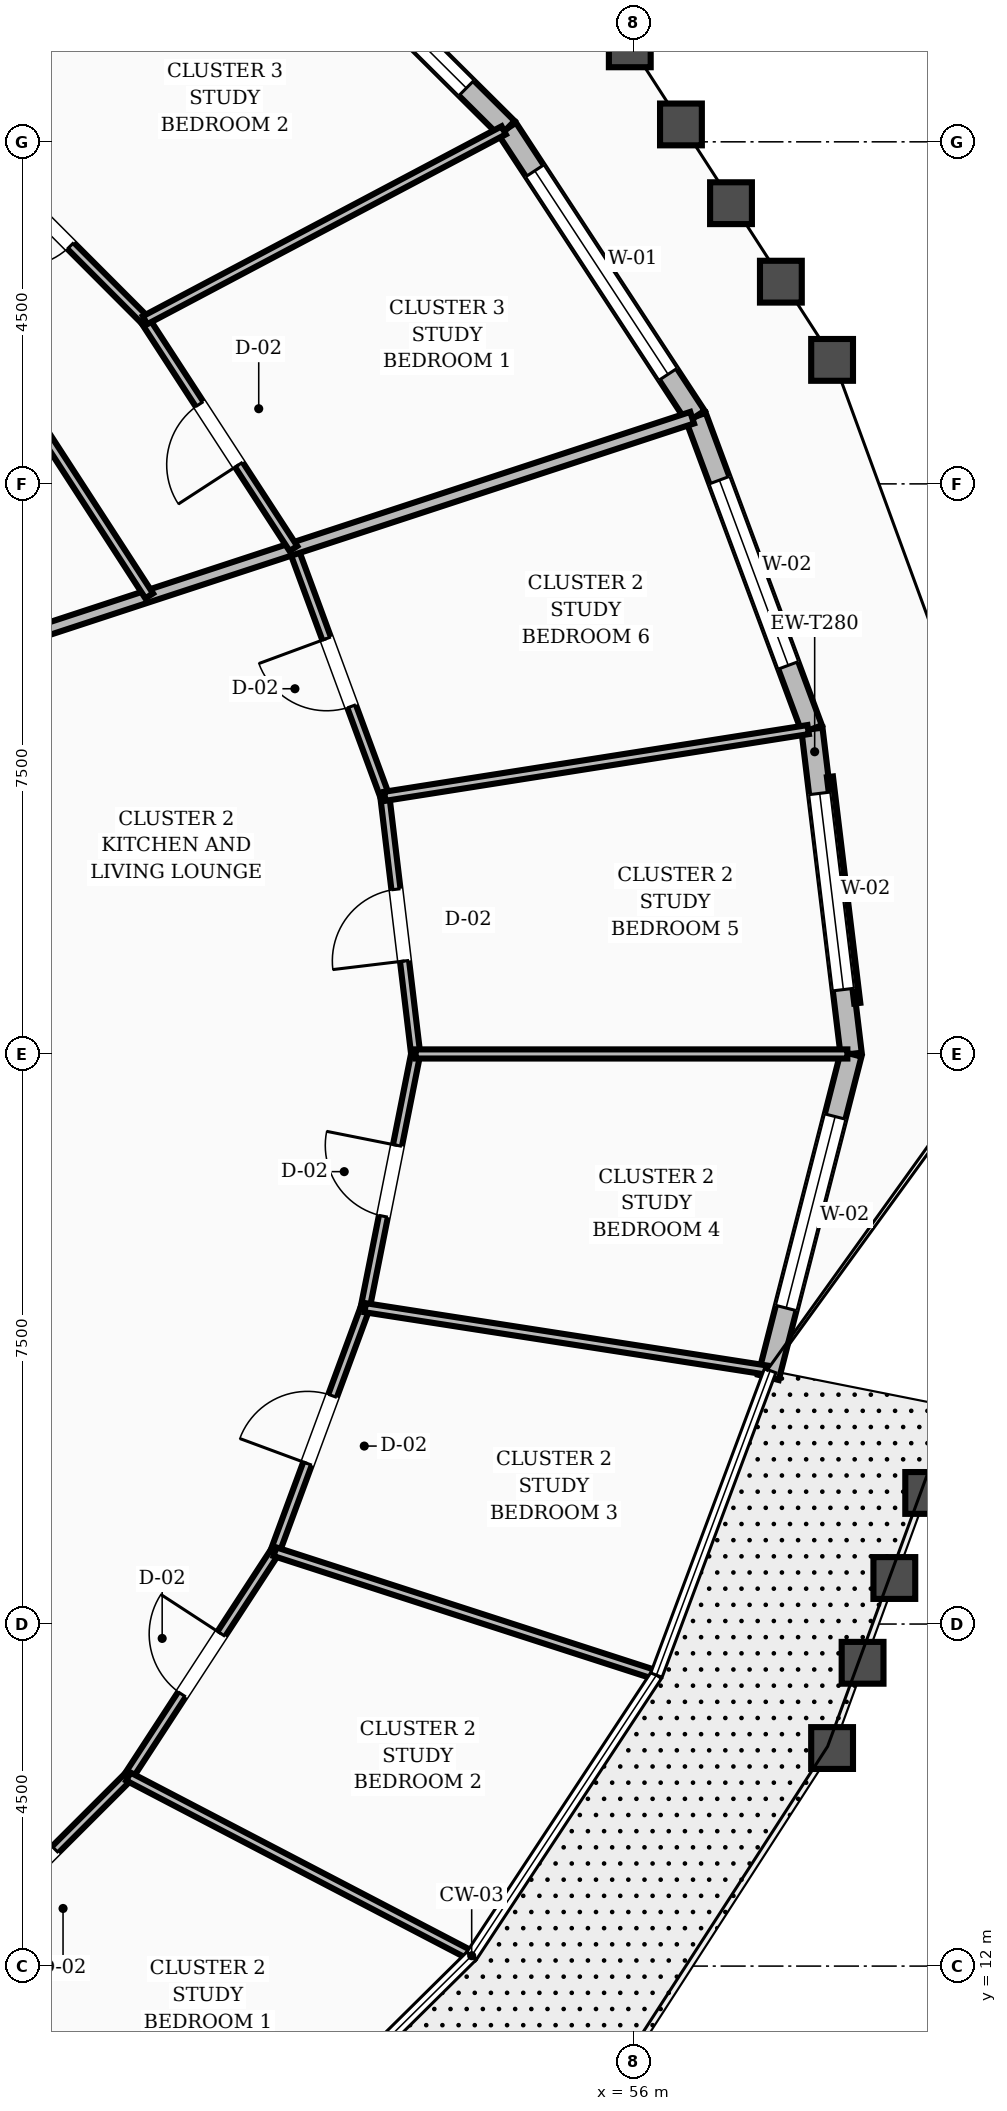
"""IFC4 building model, lengths in metres.
Left out: names, types, materials, properties, quantities, classifications, styles, units other than length and angle.
Written with IfcOpenShell. Run it as: python <this file> out.ifc"""

import sys

from ifc_helpers import new_model, si_unit, direction, frame, frame_2d, origin, place, context, subcontext, project, spatial, rectangle, extrude, element, fill, save


model = new_model("IFC4")
c1 = context("Model", 3, precision=1e-05, world=origin(), true_north=direction((0.0, 1.0)))
c2 = subcontext(c1, "Body", "Model", "MODEL_VIEW")
j1 = project(units=[si_unit("LENGTHUNIT", "METRE"), si_unit("PLANEANGLEUNIT", "RADIAN")], contexts=[c1])
p1 = place(None, origin())
s1 = spatial("IfcSite", under=j1, at=p1, CompositionType="ELEMENT")
p2 = place(p1, origin())
s2 = spatial("IfcBuilding", under=s1, at=p2, CompositionType="ELEMENT")
p3 = place(p2, frame((0.0, 0.0, 102.4)))
s3 = spatial("IfcBuildingStorey", under=s2, at=p3, CompositionType="ELEMENT", Elevation=102.4)
p4 = place(p3, frame((58.86, 24.0, 0.0), z_axis=(0.0, 0.0, 1.0), x_axis=(-0.119853881621, 0.992791542601, 0.0)))
e1 = element("IfcWall", 1, at=p4, inside=s3, PredefinedType="STANDARD", context=c2, shape_type="SweptSolid", body=[
    extrude(rectangle(XDim=4.306, YDim=0.28, at=frame_2d((2.153, 0.0))), origin(), (0.0, 0.0, 1.0), 2.67),
])
p5 = place(p4, frame((0.853, 0.0, 0.8)))
e2 = element("IfcOpeningElement", 2, at=p5, cuts=e1, PredefinedType="OPENING", context=c2, shape_type="SweptSolid", body=[
    extrude(rectangle(XDim=2.6, YDim=1.65, at=frame_2d((1.3, 0.825))), frame((0.0, 0.15, 0.0), z_axis=(0.0, -1.0, 0.0), x_axis=(1.0, 0.0, 0.0)), (0.0, 0.0, 1.0), 0.3),
])
p6 = place(p3, frame((58.344, 28.275, 0.0), z_axis=(0.0, 0.0, 1.0), x_axis=(-0.3485233369, 0.937300103295, 0.0)))
e3 = element("IfcWall", 3, at=p6, inside=s3, PredefinedType="STANDARD", context=c2, shape_type="SweptSolid", body=[
    extrude(rectangle(XDim=4.386, YDim=0.28, at=frame_2d((2.193, 0.0))), origin(), (0.0, 0.0, 1.0), 2.67),
])
p7 = place(p6, frame((0.893, 0.0, 0.8)))
e4 = element("IfcOpeningElement", 4, at=p7, cuts=e3, PredefinedType="OPENING", context=c2, shape_type="SweptSolid", body=[
    extrude(rectangle(XDim=2.6, YDim=1.65, at=frame_2d((1.3, 0.825))), frame((0.0, 0.15, 0.0), z_axis=(0.0, -1.0, 0.0), x_axis=(1.0, 0.0, 0.0)), (0.0, 0.0, 1.0), 0.3),
])
p8 = place(p3, frame((56.815, 32.386, 0.0), z_axis=(0.0, 0.0, 1.0), x_axis=(-0.547989842324, 0.836484986542, 0.0)))
e5 = element("IfcWall", 5, at=p8, inside=s3, PredefinedType="STANDARD", context=c2, shape_type="SweptSolid", body=[
    extrude(rectangle(XDim=4.529, YDim=0.28, at=frame_2d((2.265, 0.0))), origin(), (0.0, 0.0, 1.0), 2.67),
])
p9 = place(p8, frame((0.665, 0.0, 0.8)))
e6 = element("IfcOpeningElement", 6, at=p9, cuts=e5, PredefinedType="OPENING", context=c2, shape_type="SweptSolid", body=[
    extrude(rectangle(XDim=3.2, YDim=1.65, at=frame_2d((1.6, 0.825))), frame((0.0, 0.15, 0.0), z_axis=(0.0, -1.0, 0.0), x_axis=(1.0, 0.0, 0.0)), (0.0, 0.0, 1.0), 0.3),
])
p10 = place(p3, frame((54.333, 36.175, 0.0), z_axis=(0.0, 0.0, 1.0), x_axis=(-0.709177055594, 0.705030427583, 0.0)))
e7 = element("IfcWall", 7, at=p10, inside=s3, PredefinedType="STANDARD", context=c2, shape_type="SweptSolid", body=[
    extrude(rectangle(XDim=4.71, YDim=0.28, at=frame_2d((2.355, 0.0))), origin(), (0.0, 0.0, 1.0), 2.67),
])
p11 = place(p10, frame((0.755, 0.0, 0.8)))
e8 = element("IfcOpeningElement", 8, at=p11, cuts=e7, PredefinedType="OPENING", context=c2, shape_type="SweptSolid", body=[
    extrude(rectangle(XDim=3.2, YDim=1.65, at=frame_2d((1.6, 0.825))), frame((0.0, 0.15, 0.0), z_axis=(0.0, -1.0, 0.0), x_axis=(1.0, 0.0, 0.0)), (0.0, 0.0, 1.0), 0.3),
])
p12 = place(p3, frame((57.771, 19.745, 0.0), z_axis=(0.0, 0.0, 1.0), x_axis=(0.247764086513, 0.968820394828, 0.0)))
e9 = element("IfcWall", 9, at=p12, inside=s3, PredefinedType="STANDARD", context=c2, shape_type="SweptSolid", body=[
    extrude(rectangle(XDim=4.392, YDim=0.28, at=frame_2d((2.196, 0.0))), origin(), (0.0, 0.0, 1.0), 2.67),
])
p13 = place(p12, frame((0.942, 0.0, 0.8)))
e10 = element("IfcOpeningElement", 10, at=p13, cuts=e9, PredefinedType="OPENING", context=c2, shape_type="SweptSolid", body=[
    extrude(rectangle(XDim=2.6, YDim=1.65, at=frame_2d((1.3, 0.825))), frame((0.0, 0.15, 0.0), z_axis=(0.0, -1.0, 0.0), x_axis=(1.0, 0.0, 0.0)), (0.0, 0.0, 1.0), 0.3),
])
p14 = place(p3, frame((43.349, 14.56, 0.0), z_axis=(0.0, 0.0, 1.0), x_axis=(0.788161960412, -0.615467890438, 0.0)))
e11 = element("IfcWall", 11, at=p14, inside=s3, PredefinedType="SOLIDWALL", context=c2, shape_type="SweptSolid", body=[
    extrude(rectangle(XDim=9.145, YDim=0.16, at=frame_2d((4.573, 0.0))), origin(), (0.0, 0.0, 1.0), 2.67),
])
p15 = place(p3, frame((46.755, 11.9, 0.0), z_axis=(0.0, 0.0, 1.0), x_axis=(0.707406184173, 0.706807251373, 0.0)))
e12 = element("IfcWall", 12, at=p15, inside=s3, PredefinedType="PARTITIONING", context=c2, shape_type="SweptSolid", body=[
    extrude(rectangle(XDim=3.669, YDim=0.12, at=frame_2d((1.834, 0.0))), origin(), (0.0, 0.0, 1.0), 2.67),
])
p16 = place(p15, frame((1.359, 0.0, 0.0)))
e13 = element("IfcOpeningElement", 13, at=p16, cuts=e12, PredefinedType="OPENING", context=c2, shape_type="SweptSolid", body=[
    extrude(rectangle(XDim=0.95, YDim=2.1, at=frame_2d((0.475, 1.05))), frame((0.0, 0.07, 0.0), z_axis=(0.0, -1.0, 0.0), x_axis=(1.0, 0.0, 0.0)), (0.0, 0.0, 1.0), 0.14),
])
p17 = place(p3, frame((49.351, 14.493, 0.0), z_axis=(0.0, 0.0, 1.0), x_axis=(0.546023127997, 0.837770101933, 0.0)))
e14 = element("IfcWall", 14, at=p17, inside=s3, PredefinedType="PARTITIONING", context=c2, shape_type="SweptSolid", body=[
    extrude(rectangle(XDim=3.531, YDim=0.12, at=frame_2d((1.766, 0.0))), origin(), (0.0, 0.0, 1.0), 2.67),
])
p18 = place(p17, frame((1.291, 0.0, 0.0)))
e15 = element("IfcOpeningElement", 15, at=p18, cuts=e14, PredefinedType="OPENING", context=c2, shape_type="SweptSolid", body=[
    extrude(rectangle(XDim=0.95, YDim=2.1, at=frame_2d((0.475, 1.05))), frame((0.0, 0.07, 0.0), z_axis=(0.0, -1.0, 0.0), x_axis=(1.0, 0.0, 0.0)), (0.0, 0.0, 1.0), 0.14),
])
p19 = place(p3, frame((49.351, 14.493, 0.0), z_axis=(0.0, 0.0, 1.0), x_axis=(0.886579668451, -0.462575930512, 0.0)))
e16 = element("IfcWall", 16, at=p19, inside=s3, PredefinedType="PARTITIONING", context=c2, shape_type="SweptSolid", body=[
    extrude(rectangle(XDim=5.045, YDim=0.12, at=frame_2d((2.522, 0.0))), origin(), (0.0, 0.0, 1.0), 2.67),
])
p20 = place(p3, frame((51.279, 17.452, 0.0), z_axis=(0.0, 0.0, 1.0), x_axis=(0.346961196686, 0.937879484792, 0.0)))
e17 = element("IfcWall", 17, at=p20, inside=s3, PredefinedType="PARTITIONING", context=c2, shape_type="SweptSolid", body=[
    extrude(rectangle(XDim=3.423, YDim=0.12, at=frame_2d((1.711, 0.0))), origin(), (0.0, 0.0, 1.0), 2.67),
])
p21 = place(p20, frame((1.236, 0.0, 0.0)))
e18 = element("IfcOpeningElement", 18, at=p21, cuts=e17, PredefinedType="OPENING", context=c2, shape_type="SweptSolid", body=[
    extrude(rectangle(XDim=0.95, YDim=2.1, at=frame_2d((0.475, 1.05))), frame((0.0, 0.07, 0.0), z_axis=(0.0, -1.0, 0.0), x_axis=(1.0, 0.0, 0.0)), (0.0, 0.0, 1.0), 0.14),
])
p22 = place(p3, frame((51.279, 17.452, 0.0), z_axis=(0.0, 0.0, 1.0), x_axis=(0.951467861334, -0.307748125663, 0.0)))
e19 = element("IfcWall", 19, at=p22, inside=s3, PredefinedType="PARTITIONING", context=c2, shape_type="SweptSolid", body=[
    extrude(rectangle(XDim=5.225, YDim=0.12, at=frame_2d((2.612, 0.0))), origin(), (0.0, 0.0, 1.0), 2.67),
])
p23 = place(p3, frame((52.466, 20.662, 0.0), z_axis=(0.0, 0.0, 1.0), x_axis=(0.195164304361, 0.980770561499, 0.0)))
e20 = element("IfcWall", 20, at=p23, inside=s3, PredefinedType="PARTITIONING", context=c2, shape_type="SweptSolid", body=[
    extrude(rectangle(XDim=3.404, YDim=0.12, at=frame_2d((1.702, 0.0))), origin(), (0.0, 0.0, 1.0), 2.67),
])
p24 = place(p23, frame((1.227, 0.0, 0.0)))
e21 = element("IfcOpeningElement", 21, at=p24, cuts=e20, PredefinedType="OPENING", context=c2, shape_type="SweptSolid", body=[
    extrude(rectangle(XDim=0.95, YDim=2.1, at=frame_2d((0.475, 1.05))), frame((0.0, 0.07, 0.0), z_axis=(0.0, -1.0, 0.0), x_axis=(1.0, 0.0, 0.0)), (0.0, 0.0, 1.0), 0.14),
])
p25 = place(p3, frame((52.466, 20.662, 0.0), z_axis=(0.0, 0.0, 1.0), x_axis=(0.988152999311, -0.15347198426, 0.0)))
e22 = element("IfcWall", 22, at=p25, inside=s3, PredefinedType="PARTITIONING", context=c2, shape_type="SweptSolid", body=[
    extrude(rectangle(XDim=5.342, YDim=0.12, at=frame_2d((2.671, 0.0))), origin(), (0.0, 0.0, 1.0), 2.67),
])
p26 = place(p3, frame((53.131, 24.0, 0.0), z_axis=(0.0, 0.0, 1.0), x_axis=(-0.118928080867, 0.992902871172, 0.0)))
e23 = element("IfcWall", 23, at=p26, inside=s3, PredefinedType="PARTITIONING", context=c2, shape_type="SweptSolid", body=[
    extrude(rectangle(XDim=3.414, YDim=0.12, at=frame_2d((1.707, 0.0))), origin(), (0.0, 0.0, 1.0), 2.67),
])
p27 = place(p26, frame((1.232, 0.0, 0.0)))
e24 = element("IfcOpeningElement", 24, at=p27, cuts=e23, PredefinedType="OPENING", context=c2, shape_type="SweptSolid", body=[
    extrude(rectangle(XDim=0.95, YDim=2.1, at=frame_2d((0.475, 1.05))), frame((0.0, 0.07, 0.0), z_axis=(0.0, -1.0, 0.0), x_axis=(1.0, 0.0, 0.0)), (0.0, 0.0, 1.0), 0.14),
])
p28 = place(p3, frame((53.131, 24.0, 0.0), z_axis=(0.0, 0.0, 1.0), x_axis=(1.0, 0.0, 0.0)))
e25 = element("IfcWall", 25, at=p28, inside=s3, PredefinedType="PARTITIONING", context=c2, shape_type="SweptSolid", body=[
    extrude(rectangle(XDim=5.679, YDim=0.12, at=frame_2d((2.839, 0.0))), origin(), (0.0, 0.0, 1.0), 2.67),
])
p29 = place(p3, frame((52.725, 27.39, 0.0), z_axis=(0.0, 0.0, 1.0), x_axis=(-0.346151450403, 0.938178646839, 0.0)))
e26 = element("IfcWall", 26, at=p29, inside=s3, PredefinedType="PARTITIONING", context=c2, shape_type="SweptSolid", body=[
    extrude(rectangle(XDim=3.474, YDim=0.12, at=frame_2d((1.737, 0.0))), origin(), (0.0, 0.0, 1.0), 2.67),
])
p30 = place(p29, frame((1.262, 0.0, 0.0)))
e27 = element("IfcOpeningElement", 27, at=p30, cuts=e26, PredefinedType="OPENING", context=c2, shape_type="SweptSolid", body=[
    extrude(rectangle(XDim=0.95, YDim=2.1, at=frame_2d((0.475, 1.05))), frame((0.0, 0.07, 0.0), z_axis=(0.0, -1.0, 0.0), x_axis=(1.0, 0.0, 0.0)), (0.0, 0.0, 1.0), 0.14),
])
p31 = place(p3, frame((52.725, 27.39, 0.0), z_axis=(0.0, 0.0, 1.0), x_axis=(0.987809965593, 0.155664613436, 0.0)))
e28 = element("IfcWall", 28, at=p31, inside=s3, PredefinedType="PARTITIONING", context=c2, shape_type="SweptSolid", body=[
    extrude(rectangle(XDim=5.638, YDim=0.12, at=frame_2d((2.819, 0.0))), origin(), (0.0, 0.0, 1.0), 2.67),
])
p32 = place(p3, frame((46.828, 29.109, 0.0), z_axis=(0.0, 0.0, 1.0), x_axis=(0.95015260274, 0.311785232984, 0.0)))
e29 = element("IfcWall", 29, at=p32, inside=s3, PredefinedType="SOLIDWALL", context=c2, shape_type="SweptSolid", body=[
    extrude(rectangle(XDim=10.461, YDim=0.16, at=frame_2d((5.23, 0.0))), origin(), (0.0, 0.0, 1.0), 2.67),
])
p33 = place(p3, frame((49.625, 30.026, 0.0), z_axis=(0.0, 0.0, 1.0), x_axis=(-0.543463490986, 0.839432804914, 0.0)))
e30 = element("IfcWall", 30, at=p33, inside=s3, PredefinedType="PARTITIONING", context=c2, shape_type="SweptSolid", body=[
    extrude(rectangle(XDim=3.243, YDim=0.12, at=frame_2d((1.622, 0.0))), origin(), (0.0, 0.0, 1.0), 2.67),
])
p34 = place(p3, frame((51.522, 30.649, 0.0), z_axis=(0.0, 0.0, 1.0), x_axis=(-0.545007511922, 0.838431161127, 0.0)))
e31 = element("IfcWall", 31, at=p34, inside=s3, PredefinedType="PARTITIONING", context=c2, shape_type="SweptSolid", body=[
    extrude(rectangle(XDim=3.583, YDim=0.12, at=frame_2d((1.792, 0.0))), origin(), (0.0, 0.0, 1.0), 2.67),
])
p35 = place(p34, frame((1.316, 0.0, 0.0)))
e32 = element("IfcOpeningElement", 32, at=p35, cuts=e31, PredefinedType="OPENING", context=c2, shape_type="SweptSolid", body=[
    extrude(rectangle(XDim=0.95, YDim=2.1, at=frame_2d((0.475, 1.05))), frame((0.0, 0.07, 0.0), z_axis=(0.0, -1.0, 0.0), x_axis=(1.0, 0.0, 0.0)), (0.0, 0.0, 1.0), 0.14),
])
p36 = place(p3, frame((49.569, 33.653, 0.0), z_axis=(0.0, 0.0, 1.0), x_axis=(-0.706450168387, 0.707762784827, 0.0)))
e33 = element("IfcWall", 33, at=p36, inside=s3, PredefinedType="PARTITIONING", context=c2, shape_type="SweptSolid", body=[
    extrude(rectangle(XDim=3.72, YDim=0.12, at=frame_2d((1.86, 0.0))), origin(), (0.0, 0.0, 1.0), 2.67),
])
p37 = place(p36, frame((1.385, 0.0, 0.0)))
e34 = element("IfcOpeningElement", 34, at=p37, cuts=e33, PredefinedType="OPENING", context=c2, shape_type="SweptSolid", body=[
    extrude(rectangle(XDim=0.95, YDim=2.1, at=frame_2d((0.475, 1.05))), frame((0.0, 0.07, 0.0), z_axis=(0.0, -1.0, 0.0), x_axis=(1.0, 0.0, 0.0)), (0.0, 0.0, 1.0), 0.14),
])
p38 = place(p3, frame((49.569, 33.653, 0.0), z_axis=(0.0, 0.0, 1.0), x_axis=(0.883826837668, 0.467814194973, 0.0)))
e35 = element("IfcWall", 35, at=p38, inside=s3, PredefinedType="PARTITIONING", context=c2, shape_type="SweptSolid", body=[
    extrude(rectangle(XDim=5.34, YDim=0.12, at=frame_2d((2.67, 0.0))), origin(), (0.0, 0.0, 1.0), 2.67),
])
p39 = place(p3, frame((46.941, 36.286, 0.0), z_axis=(0.0, 0.0, 1.0), x_axis=(0.783824285958, 0.620982679905, 0.0)))
e36 = element("IfcWall", 36, at=p39, inside=s3, PredefinedType="PARTITIONING", context=c2, shape_type="SweptSolid", body=[
    extrude(rectangle(XDim=5.118, YDim=0.12, at=frame_2d((2.559, 0.0))), origin(), (0.0, 0.0, 1.0), 2.67),
])
p40 = place(p5, origin())
e37 = element("IfcWindow", 37, at=p40, inside=s3, PartitioningType="SINGLE_PANEL", PredefinedType="WINDOW", context=c2, shape_type="SweptSolid", body=[
    extrude(rectangle(XDim=2.6, YDim=1.65, at=frame_2d((1.3, 0.825))), frame((0.0, 0.03, 0.0), z_axis=(0.0, -1.0, 0.0), x_axis=(1.0, 0.0, 0.0)), (0.0, 0.0, 1.0), 0.06),
])
fill(e2, e37)
p41 = place(p7, origin())
e38 = element("IfcWindow", 38, at=p41, inside=s3, PartitioningType="SINGLE_PANEL", PredefinedType="WINDOW", context=c2, shape_type="SweptSolid", body=[
    extrude(rectangle(XDim=2.6, YDim=1.65, at=frame_2d((1.3, 0.825))), frame((0.0, 0.03, 0.0), z_axis=(0.0, -1.0, 0.0), x_axis=(1.0, 0.0, 0.0)), (0.0, 0.0, 1.0), 0.06),
])
fill(e4, e38)
p42 = place(p9, origin())
e39 = element("IfcWindow", 39, at=p42, inside=s3, PartitioningType="SINGLE_PANEL", PredefinedType="WINDOW", context=c2, shape_type="SweptSolid", body=[
    extrude(rectangle(XDim=3.2, YDim=1.65, at=frame_2d((1.6, 0.825))), frame((0.0, 0.03, 0.0), z_axis=(0.0, -1.0, 0.0), x_axis=(1.0, 0.0, 0.0)), (0.0, 0.0, 1.0), 0.06),
])
fill(e6, e39)
p43 = place(p11, origin())
e40 = element("IfcWindow", 40, at=p43, inside=s3, PartitioningType="SINGLE_PANEL", PredefinedType="WINDOW", context=c2, shape_type="SweptSolid", body=[
    extrude(rectangle(XDim=3.2, YDim=1.65, at=frame_2d((1.6, 0.825))), frame((0.0, 0.03, 0.0), z_axis=(0.0, -1.0, 0.0), x_axis=(1.0, 0.0, 0.0)), (0.0, 0.0, 1.0), 0.06),
])
fill(e8, e40)
p44 = place(p13, origin())
e41 = element("IfcWindow", 41, at=p44, inside=s3, PartitioningType="SINGLE_PANEL", PredefinedType="WINDOW", context=c2, shape_type="SweptSolid", body=[
    extrude(rectangle(XDim=2.6, YDim=1.65, at=frame_2d((1.3, 0.825))), frame((0.0, 0.03, 0.0), z_axis=(0.0, -1.0, 0.0), x_axis=(1.0, 0.0, 0.0)), (0.0, 0.0, 1.0), 0.06),
])
fill(e10, e41)
p45 = place(p16, origin())
e42 = element("IfcDoor", 42, at=p45, inside=s3, OperationType="SINGLE_SWING_LEFT", PredefinedType="DOOR", context=c2, shape_type="SweptSolid", body=[
    extrude(rectangle(XDim=0.95, YDim=2.1, at=frame_2d((0.475, 1.05))), frame((0.0, 0.025, 0.0), z_axis=(0.0, -1.0, 0.0), x_axis=(1.0, 0.0, 0.0)), (0.0, 0.0, 1.0), 0.05),
])
fill(e13, e42)
p46 = place(p18, origin())
e43 = element("IfcDoor", 43, at=p46, inside=s3, OperationType="SINGLE_SWING_RIGHT", PredefinedType="DOOR", context=c2, shape_type="SweptSolid", body=[
    extrude(rectangle(XDim=0.95, YDim=2.1, at=frame_2d((0.475, 1.05))), frame((0.0, 0.025, 0.0), z_axis=(0.0, -1.0, 0.0), x_axis=(1.0, 0.0, 0.0)), (0.0, 0.0, 1.0), 0.05),
])
fill(e15, e43)
p47 = place(p21, origin())
e44 = element("IfcDoor", 44, at=p47, inside=s3, OperationType="SINGLE_SWING_LEFT", PredefinedType="DOOR", context=c2, shape_type="SweptSolid", body=[
    extrude(rectangle(XDim=0.95, YDim=2.1, at=frame_2d((0.475, 1.05))), frame((0.0, 0.025, 0.0), z_axis=(0.0, -1.0, 0.0), x_axis=(1.0, 0.0, 0.0)), (0.0, 0.0, 1.0), 0.05),
])
fill(e18, e44)
p48 = place(p24, origin())
e45 = element("IfcDoor", 45, at=p48, inside=s3, OperationType="SINGLE_SWING_RIGHT", PredefinedType="DOOR", context=c2, shape_type="SweptSolid", body=[
    extrude(rectangle(XDim=0.95, YDim=2.1, at=frame_2d((0.475, 1.05))), frame((0.0, 0.025, 0.0), z_axis=(0.0, -1.0, 0.0), x_axis=(1.0, 0.0, 0.0)), (0.0, 0.0, 1.0), 0.05),
])
fill(e21, e45)
p49 = place(p27, origin())
e46 = element("IfcDoor", 46, at=p49, inside=s3, OperationType="SINGLE_SWING_LEFT", PredefinedType="DOOR", context=c2, shape_type="SweptSolid", body=[
    extrude(rectangle(XDim=0.95, YDim=2.1, at=frame_2d((0.475, 1.05))), frame((0.0, 0.025, 0.0), z_axis=(0.0, -1.0, 0.0), x_axis=(1.0, 0.0, 0.0)), (0.0, 0.0, 1.0), 0.05),
])
fill(e24, e46)
p50 = place(p30, origin())
e47 = element("IfcDoor", 47, at=p50, inside=s3, OperationType="SINGLE_SWING_RIGHT", PredefinedType="DOOR", context=c2, shape_type="SweptSolid", body=[
    extrude(rectangle(XDim=0.95, YDim=2.1, at=frame_2d((0.475, 1.05))), frame((0.0, 0.025, 0.0), z_axis=(0.0, -1.0, 0.0), x_axis=(1.0, 0.0, 0.0)), (0.0, 0.0, 1.0), 0.05),
])
fill(e27, e47)
p51 = place(p35, origin())
e48 = element("IfcDoor", 48, at=p51, inside=s3, OperationType="SINGLE_SWING_LEFT", PredefinedType="DOOR", context=c2, shape_type="SweptSolid", body=[
    extrude(rectangle(XDim=0.95, YDim=2.1, at=frame_2d((0.475, 1.05))), frame((0.0, 0.025, 0.0), z_axis=(0.0, -1.0, 0.0), x_axis=(1.0, 0.0, 0.0)), (0.0, 0.0, 1.0), 0.05),
])
fill(e32, e48)
p52 = place(p37, origin())
e49 = element("IfcDoor", 49, at=p52, inside=s3, OperationType="SINGLE_SWING_RIGHT", PredefinedType="DOOR", context=c2, shape_type="SweptSolid", body=[
    extrude(rectangle(XDim=0.95, YDim=2.1, at=frame_2d((0.475, 1.05))), frame((0.0, 0.025, 0.0), z_axis=(0.0, -1.0, 0.0), x_axis=(1.0, 0.0, 0.0)), (0.0, 0.0, 1.0), 0.05),
])
fill(e34, e49)
save(model, sys.argv[1])
